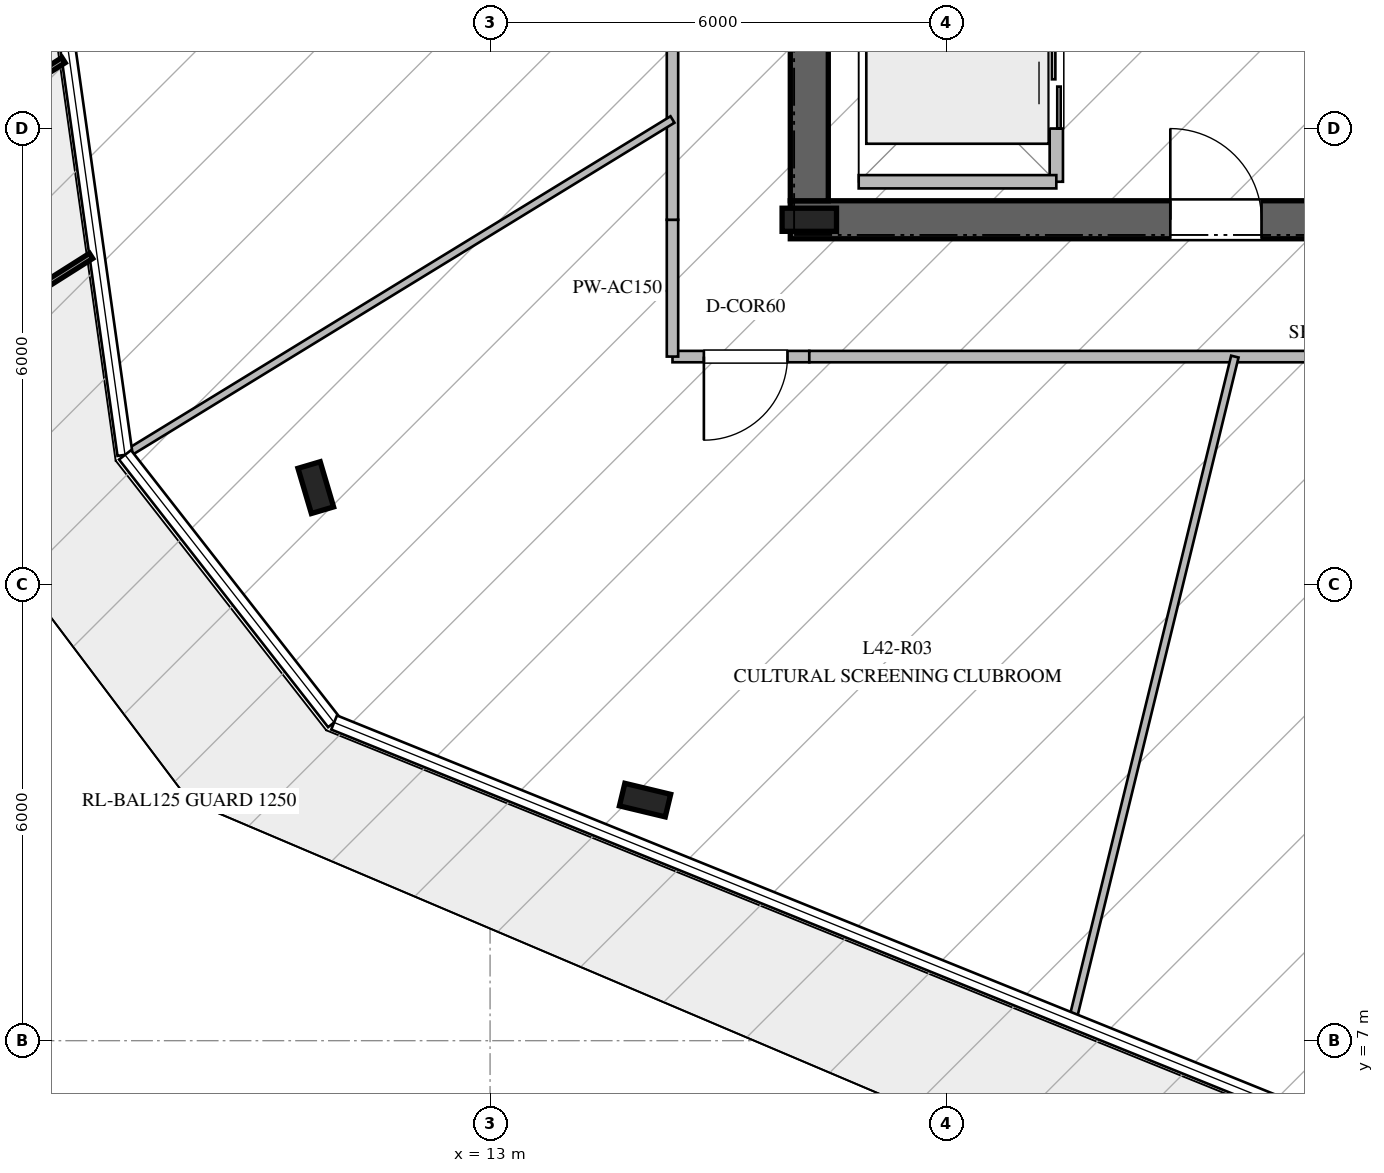
"""IFC4 building model, lengths in metres.
Left out: names, types, materials, properties, quantities, classifications, styles, units other than length and angle.
Written with IfcOpenShell. Run it as: python <this file> out.ifc"""

import sys

from ifc_helpers import new_model, si_unit, direction, frame, frame_2d, origin, origin_2d, place, context, subcontext, project, spatial, rectangle, i_section, extrude, element, fill, save


model = new_model("IFC4")
c1 = context("Model", 3, precision=1e-05, world=origin(), true_north=direction((0.0, 1.0)))
c2 = subcontext(c1, "Body", "Model", "MODEL_VIEW")
j1 = project(units=[si_unit("LENGTHUNIT", "METRE"), si_unit("PLANEANGLEUNIT", "RADIAN")], contexts=[c1])
p1 = place(None, origin())
s1 = spatial("IfcSite", under=j1, at=p1, CompositionType="ELEMENT")
p2 = place(p1, origin())
s2 = spatial("IfcBuilding", under=s1, at=p2, CompositionType="ELEMENT")
p3 = place(p2, frame((0.0, 0.0, 175.8)))
s3 = spatial("IfcBuildingStorey", under=s2, at=p3, CompositionType="ELEMENT", Elevation=175.8)
p4 = place(p3, frame((16.95, 17.8, 0.0), z_axis=(0.0, 0.0, 1.0), x_axis=(1.0, 0.0, 0.0)))
e1 = element("IfcWall", 1, at=p4, inside=s3, PredefinedType="SHEAR", context=c2, shape_type="SweptSolid", body=[
    extrude(rectangle(XDim=16.1, YDim=0.5, at=frame_2d((8.05, 0.0))), origin(), (0.0, 0.0, 1.0), 4.78),
])
p5 = place(p4, frame((5.0, 0.0, 0.0)))
e2 = element("IfcOpeningElement", 2, at=p5, cuts=e1, PredefinedType="OPENING", context=c2, shape_type="SweptSolid", body=[
    extrude(rectangle(XDim=1.2, YDim=2.25, at=frame_2d((0.6, 1.125))), frame((0.0, 0.26, 0.0), z_axis=(0.0, -1.0, 0.0), x_axis=(1.0, 0.0, 0.0)), (0.0, 0.0, 1.0), 0.52),
])
p6 = place(p4, frame((13.95, 0.0, 0.0)))
e3 = element("IfcOpeningElement", 3, at=p6, cuts=e1, PredefinedType="OPENING", context=c2, shape_type="SweptSolid", body=[
    extrude(rectangle(XDim=0.9, YDim=2.1, at=frame_2d((0.45, 1.05))), frame((0.0, 0.26, 0.0), z_axis=(0.0, -1.0, 0.0), x_axis=(1.0, 0.0, 0.0)), (0.0, 0.0, 1.0), 0.52),
])
p7 = place(p4, frame((9.2, 0.0, 0.0)))
e4 = element("IfcOpeningElement", 4, at=p7, cuts=e1, PredefinedType="OPENING", context=c2, shape_type="SweptSolid", body=[
    extrude(rectangle(XDim=1.1, YDim=2.2, at=frame_2d((0.55, 1.1))), frame((0.0, 0.26, 0.0), z_axis=(0.0, -1.0, 0.0), x_axis=(1.0, 0.0, 0.0)), (0.0, 0.0, 1.0), 0.52),
])
p8 = place(p3, frame((17.2, 31.95, 0.0), z_axis=(0.0, 0.0, 1.0), x_axis=(0.0, -1.0, 0.0)))
e5 = element("IfcWall", 5, at=p8, inside=s3, PredefinedType="SHEAR", context=c2, shape_type="SweptSolid", body=[
    extrude(rectangle(XDim=13.9, YDim=0.5, at=frame_2d((6.95, 0.0))), origin(), (0.0, 0.0, 1.0), 4.78),
])
p9 = place(p8, frame((2.1, 0.0, 0.0)))
e6 = element("IfcOpeningElement", 6, at=p9, cuts=e5, PredefinedType="OPENING", context=c2, shape_type="SweptSolid", body=[
    extrude(rectangle(XDim=1.5, YDim=2.2, at=frame_2d((0.75, 1.1))), frame((0.0, 0.26, 0.0), z_axis=(0.0, -1.0, 0.0), x_axis=(1.0, 0.0, 0.0)), (0.0, 0.0, 1.0), 0.52),
])
p10 = place(p3, frame((17.2, 17.8, 0.0), z_axis=(0.0, 0.0, 1.0), x_axis=(1.0, 0.0, 0.0)))
e7 = element("IfcColumn", 7, at=p10, inside=s3, PredefinedType="COLUMN", context=c2, shape_type="SweptSolid", body=[
    extrude(i_section(OverallWidth=0.304, OverallDepth=0.716, WebThickness=0.021, FlangeThickness=0.04, at=origin_2d()), origin(), (0.0, 0.0, 1.0), 5.0),
])
for number, where, z_axis, x_axis in (
    (8, (10.707, 14.276, -0.27), (0.0, 0.0, 1.0), (-0.284, 0.959, 0.0)),
    (9, (15.039, 10.165, -0.27), (0.0, 0.0, 1.0), (-0.972, 0.233, 0.0)),
):
    element("IfcColumn", number, at=place(p3, frame(where, z_axis=z_axis, x_axis=x_axis)), inside=s3, PredefinedType="COLUMN", context=c2, shape_type="SweptSolid", body=[
        extrude(i_section(OverallWidth=0.305, OverallDepth=0.62, WebThickness=0.021, FlangeThickness=0.04, at=origin_2d()), origin(), (0.0, 0.0, 1.0), 5.27),
    ])
p11 = place(p3, frame((20.45, 18.3, 0.0), z_axis=(0.0, 0.0, 1.0), x_axis=(0.0, 1.0, 0.0)))
e10 = element("IfcWall", 10, at=p11, inside=s3, PredefinedType="PARTITIONING", context=c2, shape_type="SweptSolid", body=[
    extrude(rectangle(XDim=2.6, YDim=0.175, at=frame_2d((1.3, 0.0))), origin(), (0.0, 0.0, 1.0), 4.78),
])
p12 = place(p11, frame((0.7, 0.0, 0.0)))
e11 = element("IfcOpeningElement", 11, at=p12, cuts=e10, PredefinedType="OPENING", context=c2, shape_type="SweptSolid", body=[
    extrude(rectangle(XDim=1.2, YDim=2.2, at=frame_2d((0.6, 1.1))), frame((0.0, 0.098, 0.0), z_axis=(0.0, -1.0, 0.0), x_axis=(1.0, 0.0, 0.0)), (0.0, 0.0, 1.0), 0.195),
])
p13 = place(p3, frame((17.85, 18.3, 0.0), z_axis=(0.0, 0.0, 1.0), x_axis=(1.0, 0.0, 0.0)))
e12 = element("IfcWall", 12, at=p13, inside=s3, PredefinedType="PARTITIONING", context=c2, shape_type="SweptSolid", body=[
    extrude(rectangle(XDim=2.6, YDim=0.175, at=frame_2d((1.3, 0.0))), origin(), (0.0, 0.0, 1.0), 4.78),
])
p14 = place(p3, frame((17.2, 16.0, 0.0), z_axis=(0.0, 0.0, 1.0), x_axis=(-1.0, 0.0, 0.0)))
e13 = element("IfcWall", 13, at=p14, inside=s3, PredefinedType="PARTITIONING", context=c2, shape_type="SweptSolid", body=[
    extrude(rectangle(XDim=1.8, YDim=0.15, at=frame_2d((0.9, 0.0))), origin(), (0.0, 0.0, 1.0), 4.28),
])
p15 = place(p14, frame((0.287, 0.0, 0.0)))
e14 = element("IfcOpeningElement", 14, at=p15, cuts=e13, PredefinedType="OPENING", context=c2, shape_type="SweptSolid", body=[
    extrude(rectangle(XDim=1.1, YDim=2.2, at=frame_2d((0.55, 1.1))), frame((0.0, 0.085, 0.0), z_axis=(0.0, -1.0, 0.0), x_axis=(1.0, 0.0, 0.0)), (0.0, 0.0, 1.0), 0.17),
])
p16 = place(p3, frame((15.4, 16.0, 0.0), z_axis=(0.0, 0.0, 1.0), x_axis=(0.0, 1.0, 0.0)))
e15 = element("IfcWall", 15, at=p16, inside=s3, PredefinedType="PARTITIONING", context=c2, shape_type="SweptSolid", body=[
    extrude(rectangle(XDim=1.8, YDim=0.15, at=frame_2d((0.9, 0.0))), origin(), (0.0, 0.0, 1.0), 4.28),
])
p17 = place(p3, frame((15.4, 17.8, 0.0), z_axis=(0.0, 0.0, 1.0), x_axis=(0.0, 1.0, 0.0)))
e16 = element("IfcWall", 16, at=p17, inside=s3, PredefinedType="PARTITIONING", context=c2, shape_type="SweptSolid", body=[
    extrude(rectangle(XDim=6.25, YDim=0.15, at=frame_2d((3.125, 0.0))), origin(), (0.0, 0.0, 1.0), 4.78),
])
p18 = place(p17, frame((3.029, 0.0, 0.0)))
e17 = element("IfcOpeningElement", 17, at=p18, cuts=e16, PredefinedType="OPENING", context=c2, shape_type="SweptSolid", body=[
    extrude(rectangle(XDim=1.1, YDim=2.2, at=frame_2d((0.55, 1.1))), frame((0.0, 0.085, 0.0), z_axis=(0.0, -1.0, 0.0), x_axis=(1.0, 0.0, 0.0)), (0.0, 0.0, 1.0), 0.17),
])
p19 = place(p3, frame((24.05, 16.0, 0.0), z_axis=(0.0, 0.0, 1.0), x_axis=(-1.0, 0.0, 0.0)))
e18 = element("IfcWall", 18, at=p19, inside=s3, PredefinedType="PARTITIONING", context=c2, shape_type="SweptSolid", body=[
    extrude(rectangle(XDim=6.85, YDim=0.15, at=frame_2d((3.425, 0.0))), origin(), (0.0, 0.0, 1.0), 4.78),
])
p20 = place(p3, frame((15.4, 19.119, 0.0), z_axis=(0.0, 0.0, 1.0), x_axis=(-0.852764414146, -0.522295753348, 0.0)))
e19 = element("IfcWall", 19, at=p20, inside=s3, PredefinedType="MOVABLE", context=c2, shape_type="SweptSolid", body=[
    extrude(rectangle(XDim=8.428, YDim=0.1, at=frame_2d((4.214, 0.0))), origin(), (0.0, 0.0, 1.0), 4.18),
])
p21 = place(p3, frame((22.799, 16.0, 0.0), z_axis=(0.0, 0.0, 1.0), x_axis=(-0.237561419307, -0.971372519715, 0.0)))
e20 = element("IfcWall", 20, at=p21, inside=s3, PredefinedType="MOVABLE", context=c2, shape_type="SweptSolid", body=[
    extrude(rectangle(XDim=8.979, YDim=0.1, at=frame_2d((4.49, 0.0))), origin(), (0.0, 0.0, 1.0), 4.05),
])
p22 = place(p5, origin())
e21 = element("IfcDoor", 21, at=p22, inside=s3, OperationType="SINGLE_SWING_LEFT", PredefinedType="DOOR", context=c2, shape_type="SweptSolid", body=[
    extrude(rectangle(XDim=1.2, YDim=2.25, at=frame_2d((0.6, 1.125))), frame((0.0, 0.025, 0.0), z_axis=(0.0, -1.0, 0.0), x_axis=(1.0, 0.0, 0.0)), (0.0, 0.0, 1.0), 0.05),
])
fill(e2, e21)
p23 = place(p12, origin())
e22 = element("IfcDoor", 22, at=p23, inside=s3, OperationType="DOUBLE_DOOR_SLIDING", PredefinedType="DOOR", context=c2, shape_type="SweptSolid", body=[
    extrude(rectangle(XDim=1.2, YDim=2.2, at=frame_2d((0.6, 1.1))), frame((0.0, 0.025, 0.0), z_axis=(0.0, -1.0, 0.0), x_axis=(1.0, 0.0, 0.0)), (0.0, 0.0, 1.0), 0.05),
])
fill(e11, e22)
p24 = place(p15, origin())
e23 = element("IfcDoor", 23, at=p24, inside=s3, OperationType="SINGLE_SWING_RIGHT", PredefinedType="DOOR", context=c2, shape_type="SweptSolid", body=[
    extrude(rectangle(XDim=1.1, YDim=2.2, at=frame_2d((0.55, 1.1))), frame((0.0, 0.025, 0.0), z_axis=(0.0, -1.0, 0.0), x_axis=(1.0, 0.0, 0.0)), (0.0, 0.0, 1.0), 0.05),
])
fill(e14, e23)
save(model, sys.argv[1])
